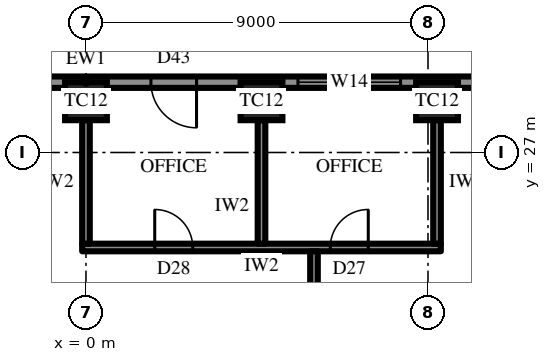
"""IFC4 building model, lengths in metres.
Left out: names, types, materials, properties, quantities, classifications, styles, units other than length and angle.
Written with IfcOpenShell. Run it as: python <this file> out.ifc"""

import sys

from ifc_helpers import new_model, si_unit, direction, frame, frame_2d, origin, origin_2d, place, context, subcontext, project, spatial, rectangle, extrude, element, fill, save


model = new_model("IFC4")
c1 = context("Model", 3, precision=1e-05, world=origin(), true_north=direction((0.0, 1.0)))
c2 = subcontext(c1, "Body", "Model", "MODEL_VIEW")
j1 = project(units=[si_unit("LENGTHUNIT", "METRE"), si_unit("PLANEANGLEUNIT", "RADIAN")], contexts=[c1])
p1 = place(None, origin())
s1 = spatial("IfcSite", under=j1, at=p1, CompositionType="ELEMENT")
p2 = place(p1, origin())
s2 = spatial("IfcBuilding", under=s1, at=p2, CompositionType="ELEMENT")
p3 = place(p2, frame((0.0, 0.0, 291.1)))
s3 = spatial("IfcBuildingStorey", under=s2, at=p3, CompositionType="ELEMENT", Elevation=291.1)
for number, where, z_axis, x_axis in (
    (1, (9.238, 28.35, 0.0), (0.0, 0.0, 1.0), (-1.0, 0.0, 0.0)),
    (2, (4.619, 28.35, 0.0), (0.0, 0.0, 1.0), (-1.0, 0.0, 0.0)),
    (3, (0.0, 28.35, 0.0), (0.0, 0.0, 1.0), (-1.0, 0.0, 0.0)),
):
    element("IfcColumn", number, at=place(p3, frame(where, z_axis=z_axis, x_axis=x_axis)), inside=s3, PredefinedType="COLUMN", context=c2, shape_type="SweptSolid", body=[
        extrude(rectangle(XDim=1.1, YDim=1.0, at=origin_2d()), origin(), (0.0, 0.0, 1.0), 4.2),
    ])
p4 = place(p3, frame((12.556, 28.85, 0.0), z_axis=(0.0, 0.0, 1.0), x_axis=(-1.0, 0.0, 0.0)))
e4 = element("IfcWall", 4, at=p4, inside=s3, PredefinedType="SOLIDWALL", context=c2, shape_type="SweptSolid", body=[
    extrude(rectangle(XDim=25.113, YDim=0.3, at=frame_2d((12.556, 0.0))), origin(), (0.0, 0.0, 1.0), 2.8),
])
p5 = place(p4, frame((4.278, 0.0, 0.6)))
e5 = element("IfcOpeningElement", 5, at=p5, cuts=e4, PredefinedType="OPENING", context=c2, shape_type="SweptSolid", body=[
    extrude(rectangle(XDim=2.7, YDim=1.95, at=frame_2d((1.35, 0.975))), frame((0.0, 0.16, 0.0), z_axis=(0.0, -1.0, 0.0), x_axis=(1.0, 0.0, 0.0)), (0.0, 0.0, 1.0), 0.32),
])
p6 = place(p4, frame((9.647, 0.0, 0.0)))
e6 = element("IfcOpeningElement", 6, at=p6, cuts=e4, PredefinedType="OPENING", context=c2, shape_type="SweptSolid", body=[
    extrude(rectangle(XDim=1.2, YDim=2.4, at=frame_2d((0.6, 1.2))), frame((0.0, 0.16, 0.0), z_axis=(0.0, -1.0, 0.0), x_axis=(1.0, 0.0, 0.0)), (0.0, 0.0, 1.0), 0.32),
])
p7 = place(p4, frame((13.516, 0.0, 0.6)))
e7 = element("IfcOpeningElement", 7, at=p7, cuts=e4, PredefinedType="OPENING", context=c2, shape_type="SweptSolid", body=[
    extrude(rectangle(XDim=2.7, YDim=1.95, at=frame_2d((1.35, 0.975))), frame((0.0, 0.16, 0.0), z_axis=(0.0, -1.0, 0.0), x_axis=(1.0, 0.0, 0.0)), (0.0, 0.0, 1.0), 0.32),
])
p8 = place(p4, frame((18.135, 0.0, 0.6)))
e8 = element("IfcOpeningElement", 8, at=p8, cuts=e4, PredefinedType="OPENING", context=c2, shape_type="SweptSolid", body=[
    extrude(rectangle(XDim=2.7, YDim=1.95, at=frame_2d((1.35, 0.975))), frame((0.0, 0.16, 0.0), z_axis=(0.0, -1.0, 0.0), x_axis=(1.0, 0.0, 0.0)), (0.0, 0.0, 1.0), 0.32),
])
p9 = place(p3, frame((9.338, 24.5, 0.0), z_axis=(0.0, 0.0, 1.0), x_axis=(-1.0, 0.0, 0.0)))
e9 = element("IfcWall", 9, at=p9, inside=s3, PredefinedType="PARTITIONING", context=c2, shape_type="SweptSolid", body=[
    extrude(rectangle(XDim=9.438, YDim=0.2, at=frame_2d((4.719, 0.0))), origin(), (0.0, 0.0, 1.0), 4.0),
])
p10 = place(p9, frame((1.909, 0.0, 0.0)))
e10 = element("IfcOpeningElement", 10, at=p10, cuts=e9, PredefinedType="OPENING", context=c2, shape_type="SweptSolid", body=[
    extrude(rectangle(XDim=1.0, YDim=2.2, at=frame_2d((0.5, 1.1))), frame((0.0, 0.11, 0.0), z_axis=(0.0, -1.0, 0.0), x_axis=(1.0, 0.0, 0.0)), (0.0, 0.0, 1.0), 0.22),
])
p11 = place(p9, frame((6.528, 0.0, 0.0)))
e11 = element("IfcOpeningElement", 11, at=p11, cuts=e9, PredefinedType="OPENING", context=c2, shape_type="SweptSolid", body=[
    extrude(rectangle(XDim=1.0, YDim=2.2, at=frame_2d((0.5, 1.1))), frame((0.0, 0.11, 0.0), z_axis=(0.0, -1.0, 0.0), x_axis=(1.0, 0.0, 0.0)), (0.0, 0.0, 1.0), 0.22),
])
for number, where, z_axis, x_axis in (
    (12, (9.238, 24.6, 0.0), (0.0, 0.0, 1.0), (0.0, 1.0, 0.0)),
    (13, (4.619, 24.6, 0.0), (0.0, 0.0, 1.0), (0.0, 1.0, 0.0)),
    (14, (0.0, 24.6, 0.0), (0.0, 0.0, 1.0), (0.0, 1.0, 0.0)),
):
    element("IfcWall", number, at=place(p3, frame(where, z_axis=z_axis, x_axis=x_axis)), inside=s3, PredefinedType="PARTITIONING", context=c2, shape_type="SweptSolid", body=[
        extrude(rectangle(XDim=3.25, YDim=0.2, at=frame_2d((1.625, 0.0))), origin(), (0.0, 0.0, 1.0), 2.992),
    ])
p12 = place(p3, frame((6.0, 17.7, 0.0), z_axis=(0.0, 0.0, 1.0), x_axis=(0.0, 1.0, 0.0)))
e15 = element("IfcWall", 15, at=p12, inside=s3, PredefinedType="PARTITIONING", context=c2, shape_type="SweptSolid", body=[
    extrude(rectangle(XDim=6.7, YDim=0.2, at=frame_2d((3.35, 0.0))), origin(), (0.0, 0.0, 1.0), 4.0),
])
p13 = place(p5, origin())
e16 = element("IfcWindow", 16, at=p13, inside=s3, PartitioningType="SINGLE_PANEL", PredefinedType="WINDOW", context=c2, shape_type="SweptSolid", body=[
    extrude(rectangle(XDim=2.7, YDim=1.95, at=frame_2d((1.35, 0.975))), frame((0.0, 0.03, 0.0), z_axis=(0.0, -1.0, 0.0), x_axis=(1.0, 0.0, 0.0)), (0.0, 0.0, 1.0), 0.06),
])
fill(e5, e16)
p14 = place(p6, origin())
e17 = element("IfcDoor", 17, at=p14, inside=s3, OperationType="SINGLE_SWING_RIGHT", PredefinedType="DOOR", context=c2, shape_type="SweptSolid", body=[
    extrude(rectangle(XDim=1.2, YDim=2.4, at=frame_2d((0.6, 1.2))), frame((0.0, 0.025, 0.0), z_axis=(0.0, -1.0, 0.0), x_axis=(1.0, 0.0, 0.0)), (0.0, 0.0, 1.0), 0.05),
])
fill(e6, e17)
p15 = place(p10, frame((1.0, 0.0, 0.0), z_axis=(0.0, 0.0, 1.0), x_axis=(-1.0, 0.0, 0.0)))
e18 = element("IfcDoor", 18, at=p15, inside=s3, OperationType="SINGLE_SWING_LEFT", PredefinedType="DOOR", context=c2, shape_type="SweptSolid", body=[
    extrude(rectangle(XDim=1.0, YDim=2.2, at=frame_2d((0.5, 1.1))), frame((0.0, 0.025, 0.0), z_axis=(0.0, -1.0, 0.0), x_axis=(1.0, 0.0, 0.0)), (0.0, 0.0, 1.0), 0.05),
])
fill(e10, e18)
p16 = place(p11, frame((1.0, 0.0, 0.0), z_axis=(0.0, 0.0, 1.0), x_axis=(-1.0, 0.0, 0.0)))
e19 = element("IfcDoor", 19, at=p16, inside=s3, OperationType="SINGLE_SWING_RIGHT", PredefinedType="DOOR", context=c2, shape_type="SweptSolid", body=[
    extrude(rectangle(XDim=1.0, YDim=2.2, at=frame_2d((0.5, 1.1))), frame((0.0, 0.025, 0.0), z_axis=(0.0, -1.0, 0.0), x_axis=(1.0, 0.0, 0.0)), (0.0, 0.0, 1.0), 0.05),
])
fill(e11, e19)
save(model, sys.argv[1])
